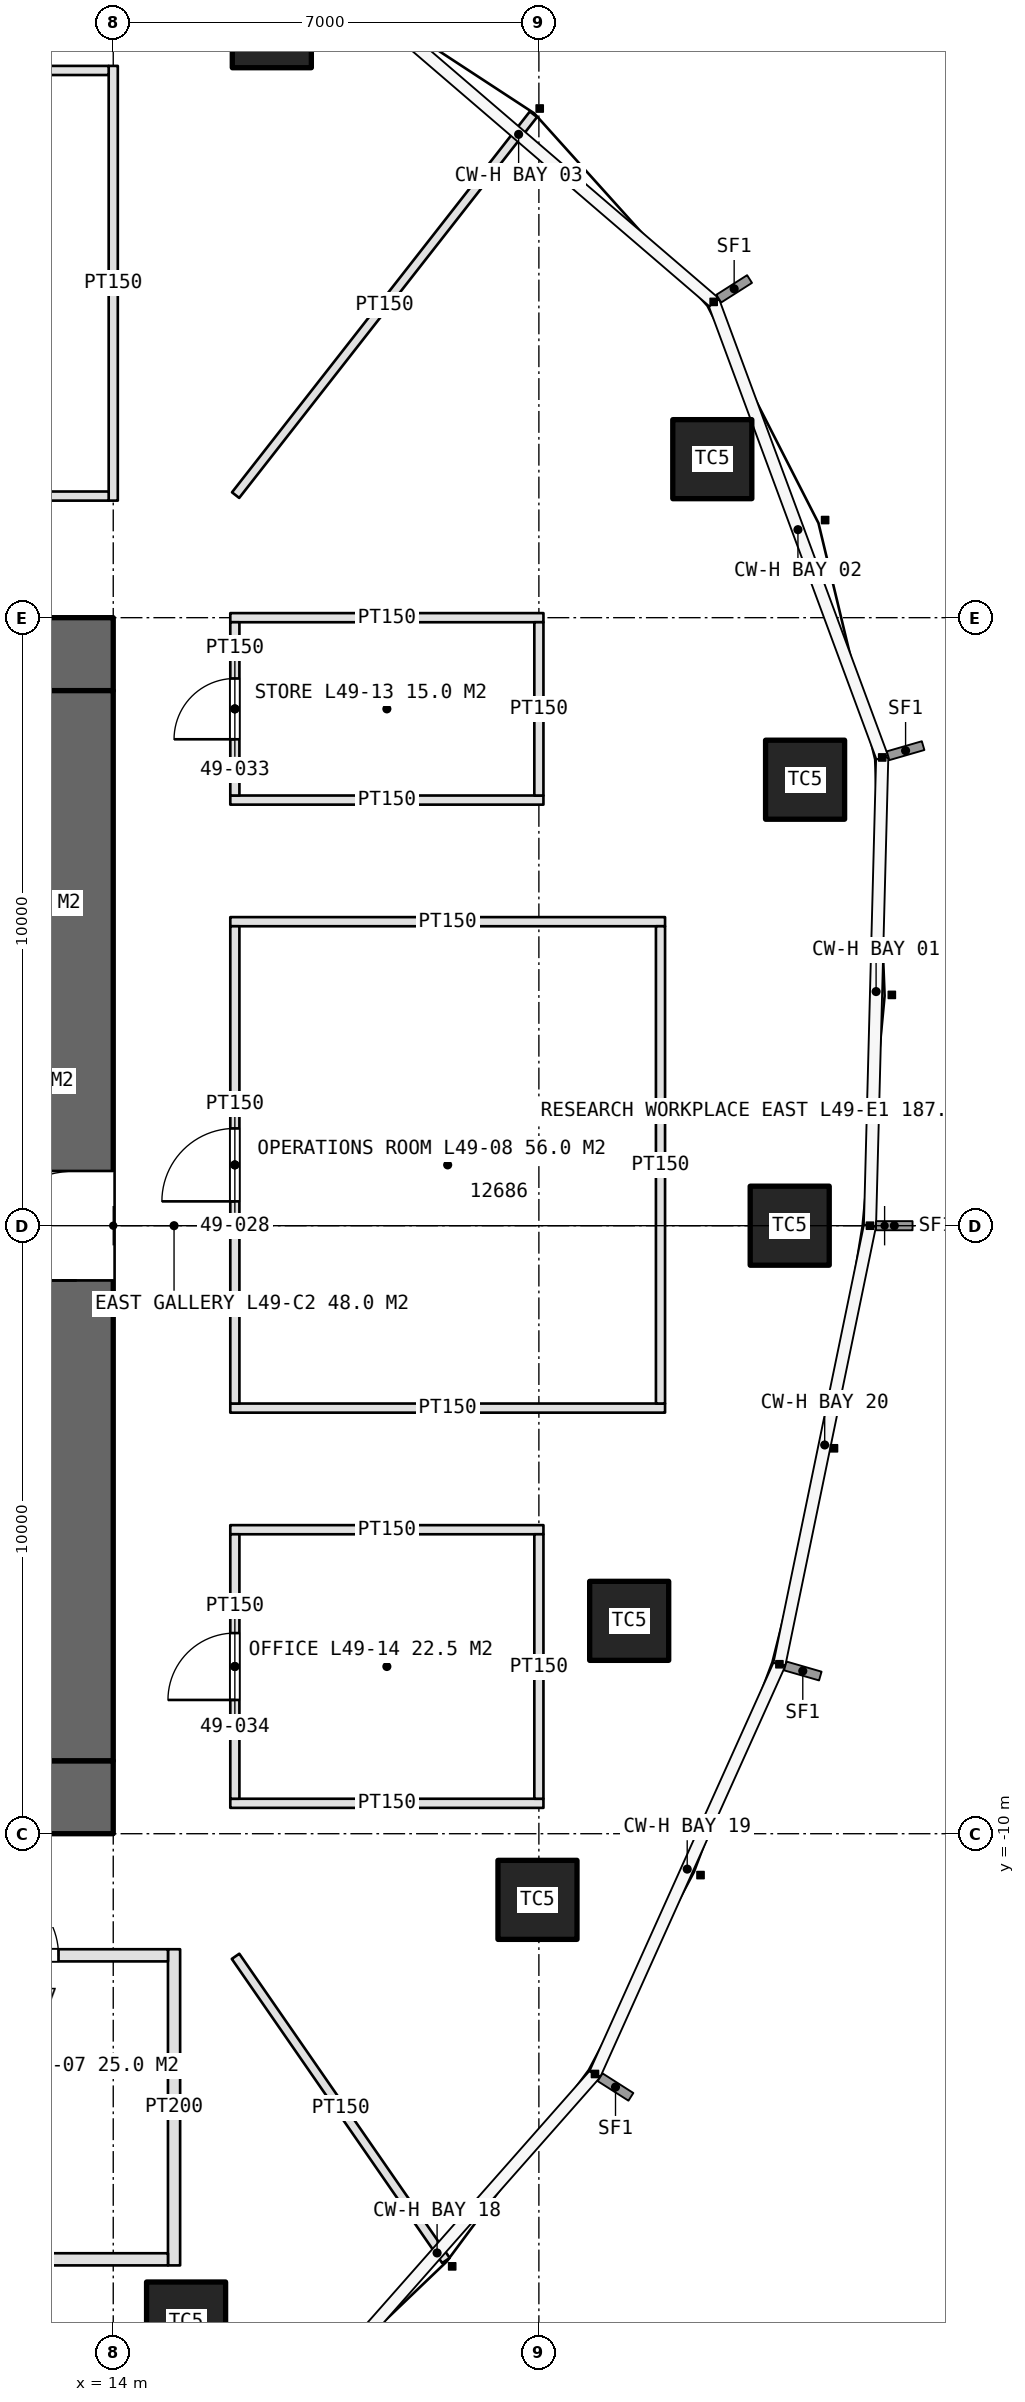
"""IFC4 building model, lengths in metres.
Left out: names, types, materials, properties, quantities, classifications, styles, units other than length and angle.
Written with IfcOpenShell. Run it as: python <this file> out.ifc"""

import sys

from ifc_helpers import new_model, si_unit, direction, frame, frame_2d, origin, origin_2d, place, context, subcontext, project, spatial, rectangle, extrude, element, fill, save


model = new_model("IFC4")
c1 = context("Model", 3, precision=1e-05, world=origin(), true_north=direction((0.0, 1.0)))
c2 = subcontext(c1, "Body", "Model", "MODEL_VIEW")
j1 = project(units=[si_unit("LENGTHUNIT", "METRE"), si_unit("PLANEANGLEUNIT", "RADIAN")], contexts=[c1])
p1 = place(None, origin())
s1 = spatial("IfcSite", under=j1, at=p1, CompositionType="ELEMENT")
p2 = place(p1, origin())
s2 = spatial("IfcBuilding", under=s1, at=p2, CompositionType="ELEMENT")
p3 = place(p2, frame((0.0, 0.0, 224.2)))
s3 = spatial("IfcBuildingStorey", under=s2, at=p3, CompositionType="ELEMENT", Elevation=224.2)
p4 = place(p3, frame((-14.0, -9.4, 0.0), z_axis=(0.0, 0.0, 1.0), x_axis=(1.0, 0.0, 0.0)))
e1 = element("IfcWall", 1, at=p4, inside=s3, PredefinedType="SHEAR", context=c2, shape_type="SweptSolid", body=[
    extrude(rectangle(XDim=28.0, YDim=1.2, at=frame_2d((14.0, 0.0))), origin(), (0.0, 0.0, 1.0), 4.2),
])
p5 = place(p4, frame((22.9, 0.0, 0.0)))
e2 = element("IfcOpeningElement", 2, at=p5, cuts=e1, PredefinedType="OPENING", context=c2, shape_type="SweptSolid", body=[
    extrude(rectangle(XDim=2.2, YDim=2.7, at=frame_2d((1.1, 1.35))), frame((0.0, 0.61, 0.0), z_axis=(0.0, -1.0, 0.0), x_axis=(1.0, 0.0, 0.0)), (0.0, 0.0, 1.0), 1.22),
])
p6 = place(p3, frame((14.0, 9.4, 0.0), z_axis=(0.0, 0.0, 1.0), x_axis=(-1.0, 0.0, 0.0)))
e3 = element("IfcWall", 3, at=p6, inside=s3, PredefinedType="SHEAR", context=c2, shape_type="SweptSolid", body=[
    extrude(rectangle(XDim=28.0, YDim=1.2, at=frame_2d((14.0, 0.0))), origin(), (0.0, 0.0, 1.0), 4.2),
])
p7 = place(p6, frame((24.0, 0.0, 0.0)))
e4 = element("IfcOpeningElement", 4, at=p7, cuts=e3, PredefinedType="OPENING", context=c2, shape_type="SweptSolid", body=[
    extrude(rectangle(XDim=1.0, YDim=2.4, at=frame_2d((0.5, 1.2))), frame((0.0, 0.61, 0.0), z_axis=(0.0, -1.0, 0.0), x_axis=(1.0, 0.0, 0.0)), (0.0, 0.0, 1.0), 1.22),
])
p8 = place(p3, frame((13.4, -8.8, 0.0), z_axis=(0.0, 0.0, 1.0), x_axis=(0.0, 1.0, 0.0)))
e5 = element("IfcWall", 5, at=p8, inside=s3, PredefinedType="SHEAR", context=c2, shape_type="SweptSolid", body=[
    extrude(rectangle(XDim=17.6, YDim=1.2, at=frame_2d((8.8, 0.0))), origin(), (0.0, 0.0, 1.0), 4.2),
])
p9 = place(p8, frame((7.9, 0.0, 0.0)))
e6 = element("IfcOpeningElement", 6, at=p9, cuts=e5, PredefinedType="OPENING", context=c2, shape_type="SweptSolid", body=[
    extrude(rectangle(XDim=1.8, YDim=2.4, at=frame_2d((0.9, 1.2))), frame((0.0, 0.61, 0.0), z_axis=(0.0, -1.0, 0.0), x_axis=(1.0, 0.0, 0.0)), (0.0, 0.0, 1.0), 1.22),
])
for number, where, z_axis, x_axis in (
    (7, (25.125, 0.0, 0.0), (0.0, 0.0, 1.0), (1.0, 0.0, 0.0)),
    (8, (25.378, 7.335, 0.0), (0.0, 0.0, 1.0), (1.0, 0.0, 0.0)),
    (9, (23.852, 12.607, 0.0), (0.0, 0.0, 1.0), (1.0, 0.0, 0.0)),
    (10, (16.608, 19.695, 0.0), (0.0, 0.0, 1.0), (1.0, 0.0, 0.0)),
    (11, (15.198, -18.023, 0.0), (0.0, 0.0, 1.0), (1.0, 0.0, 0.0)),
    (12, (20.977, -11.088, 0.0), (0.0, 0.0, 1.0), (1.0, 0.0, 0.0)),
    (13, (22.485, -6.499, 0.0), (0.0, 0.0, 1.0), (1.0, 0.0, 0.0)),
):
    element("IfcColumn", number, at=place(p3, frame(where, z_axis=z_axis, x_axis=x_axis)), inside=s3, PredefinedType="COLUMN", context=c2, shape_type="SweptSolid", body=[
        extrude(rectangle(XDim=1.3, YDim=1.3, at=origin_2d()), origin(), (0.0, 0.0, 1.0), 4.2),
    ])
p10 = place(p3, frame((14.0, 11.925, 0.0), z_axis=(0.0, 0.0, 1.0), x_axis=(0.0, 1.0, 0.0)))
e14 = element("IfcWall", 14, at=p10, inside=s3, PredefinedType="PARTITIONING", context=c2, shape_type="SweptSolid", body=[
    extrude(rectangle(XDim=7.15, YDim=0.15, at=frame_2d((3.575, 0.0))), origin(), (0.0, 0.0, 1.0), 3.0),
])
p11 = place(p3, frame((4.075, 12.0, 0.0), z_axis=(0.0, 0.0, 1.0), x_axis=(1.0, 0.0, 0.0)))
e15 = element("IfcWall", 15, at=p11, inside=s3, PredefinedType="PARTITIONING", context=c2, shape_type="SweptSolid", body=[
    extrude(rectangle(XDim=9.85, YDim=0.15, at=frame_2d((4.925, 0.0))), origin(), (0.0, 0.0, 1.0), 3.0),
])
p12 = place(p11, frame((4.325, 0.0, 0.0)))
e16 = element("IfcOpeningElement", 16, at=p12, cuts=e15, PredefinedType="OPENING", context=c2, shape_type="SweptSolid", body=[
    extrude(rectangle(XDim=1.2, YDim=2.4, at=frame_2d((0.6, 1.2))), frame((0.0, 0.085, 0.0), z_axis=(0.0, -1.0, 0.0), x_axis=(1.0, 0.0, 0.0)), (0.0, 0.0, 1.0), 0.17),
])
p13 = place(p3, frame((4.075, 19.0, 0.0), z_axis=(0.0, 0.0, 1.0), x_axis=(1.0, 0.0, 0.0)))
e17 = element("IfcWall", 17, at=p13, inside=s3, PredefinedType="PARTITIONING", context=c2, shape_type="SweptSolid", body=[
    extrude(rectangle(XDim=9.85, YDim=0.15, at=frame_2d((4.925, 0.0))), origin(), (0.0, 0.0, 1.0), 3.0),
])
p14 = place(p3, frame((15.0, -11.9, 0.0), z_axis=(0.0, 0.0, 1.0), x_axis=(0.0, -1.0, 0.0)))
e18 = element("IfcWall", 18, at=p14, inside=s3, PredefinedType="PARTITIONING", context=c2, shape_type="SweptSolid", body=[
    extrude(rectangle(XDim=5.2, YDim=0.2, at=frame_2d((2.6, 0.0))), origin(), (0.0, 0.0, 1.0), 3.0),
])
p15 = place(p3, frame((10.1, -12.0, 0.0), z_axis=(0.0, 0.0, 1.0), x_axis=(1.0, 0.0, 0.0)))
e19 = element("IfcWall", 19, at=p15, inside=s3, PredefinedType="PARTITIONING", context=c2, shape_type="SweptSolid", body=[
    extrude(rectangle(XDim=4.8, YDim=0.2, at=frame_2d((2.4, 0.0))), origin(), (0.0, 0.0, 1.0), 3.0),
])
p16 = place(p15, frame((1.8, 0.0, 0.0)))
e20 = element("IfcOpeningElement", 20, at=p16, cuts=e19, PredefinedType="OPENING", context=c2, shape_type="SweptSolid", body=[
    extrude(rectangle(XDim=1.2, YDim=2.4, at=frame_2d((0.6, 1.2))), frame((0.0, 0.11, 0.0), z_axis=(0.0, -1.0, 0.0), x_axis=(1.0, 0.0, 0.0)), (0.0, 0.0, 1.0), 0.22),
])
p17 = place(p3, frame((10.1, -17.0, 0.0), z_axis=(0.0, 0.0, 1.0), x_axis=(1.0, 0.0, 0.0)))
e21 = element("IfcWall", 21, at=p17, inside=s3, PredefinedType="PARTITIONING", context=c2, shape_type="SweptSolid", body=[
    extrude(rectangle(XDim=4.8, YDim=0.2, at=frame_2d((2.4, 0.0))), origin(), (0.0, 0.0, 1.0), 3.0),
])
for number, where, z_axis, x_axis in (
    (22, (15.925, -3.0, 0.0), (0.0, 0.0, 1.0), (1.0, 0.0, 0.0)),
    (23, (15.925, 5.0, 0.0), (0.0, 0.0, 1.0), (1.0, 0.0, 0.0)),
):
    element("IfcWall", number, at=place(p3, frame(where, z_axis=z_axis, x_axis=x_axis)), inside=s3, PredefinedType="PARTITIONING", context=c2, shape_type="SweptSolid", body=[
        extrude(rectangle(XDim=7.15, YDim=0.15, at=frame_2d((3.575, 0.0))), origin(), (0.0, 0.0, 1.0), 3.0),
    ])
p18 = place(p3, frame((16.0, -2.925, 0.0), z_axis=(0.0, 0.0, 1.0), x_axis=(0.0, 1.0, 0.0)))
e24 = element("IfcWall", 24, at=p18, inside=s3, PredefinedType="PARTITIONING", context=c2, shape_type="SweptSolid", body=[
    extrude(rectangle(XDim=7.85, YDim=0.15, at=frame_2d((3.925, 0.0))), origin(), (0.0, 0.0, 1.0), 3.0),
])
p19 = place(p18, frame((3.325, 0.0, 0.0)))
e25 = element("IfcOpeningElement", 25, at=p19, cuts=e24, PredefinedType="OPENING", context=c2, shape_type="SweptSolid", body=[
    extrude(rectangle(XDim=1.2, YDim=2.4, at=frame_2d((0.6, 1.2))), frame((0.0, 0.085, 0.0), z_axis=(0.0, -1.0, 0.0), x_axis=(1.0, 0.0, 0.0)), (0.0, 0.0, 1.0), 0.17),
])
p20 = place(p3, frame((23.0, -2.925, 0.0), z_axis=(0.0, 0.0, 1.0), x_axis=(0.0, 1.0, 0.0)))
e26 = element("IfcWall", 26, at=p20, inside=s3, PredefinedType="PARTITIONING", context=c2, shape_type="SweptSolid", body=[
    extrude(rectangle(XDim=7.85, YDim=0.15, at=frame_2d((3.925, 0.0))), origin(), (0.0, 0.0, 1.0), 3.0),
])
for number, where, z_axis, x_axis in (
    (27, (15.925, 7.0, 0.0), (0.0, 0.0, 1.0), (1.0, 0.0, 0.0)),
    (28, (15.925, 10.0, 0.0), (0.0, 0.0, 1.0), (1.0, 0.0, 0.0)),
):
    element("IfcWall", number, at=place(p3, frame(where, z_axis=z_axis, x_axis=x_axis)), inside=s3, PredefinedType="PARTITIONING", context=c2, shape_type="SweptSolid", body=[
        extrude(rectangle(XDim=5.15, YDim=0.15, at=frame_2d((2.575, 0.0))), origin(), (0.0, 0.0, 1.0), 3.0),
    ])
p21 = place(p3, frame((16.0, 7.075, 0.0), z_axis=(0.0, 0.0, 1.0), x_axis=(0.0, 1.0, 0.0)))
e29 = element("IfcWall", 29, at=p21, inside=s3, PredefinedType="PARTITIONING", context=c2, shape_type="SweptSolid", body=[
    extrude(rectangle(XDim=2.85, YDim=0.15, at=frame_2d((1.425, 0.0))), origin(), (0.0, 0.0, 1.0), 3.0),
])
p22 = place(p21, frame((0.925, 0.0, 0.0)))
e30 = element("IfcOpeningElement", 30, at=p22, cuts=e29, PredefinedType="OPENING", context=c2, shape_type="SweptSolid", body=[
    extrude(rectangle(XDim=1.0, YDim=2.2, at=frame_2d((0.5, 1.1))), frame((0.0, 0.085, 0.0), z_axis=(0.0, -1.0, 0.0), x_axis=(1.0, 0.0, 0.0)), (0.0, 0.0, 1.0), 0.17),
])
p23 = place(p3, frame((21.0, 7.075, 0.0), z_axis=(0.0, 0.0, 1.0), x_axis=(0.0, 1.0, 0.0)))
e31 = element("IfcWall", 31, at=p23, inside=s3, PredefinedType="PARTITIONING", context=c2, shape_type="SweptSolid", body=[
    extrude(rectangle(XDim=2.85, YDim=0.15, at=frame_2d((1.425, 0.0))), origin(), (0.0, 0.0, 1.0), 3.0),
])
for number, where, z_axis, x_axis in (
    (32, (15.925, -9.5, 0.0), (0.0, 0.0, 1.0), (1.0, 0.0, 0.0)),
    (33, (15.925, -5.0, 0.0), (0.0, 0.0, 1.0), (1.0, 0.0, 0.0)),
):
    element("IfcWall", number, at=place(p3, frame(where, z_axis=z_axis, x_axis=x_axis)), inside=s3, PredefinedType="PARTITIONING", context=c2, shape_type="SweptSolid", body=[
        extrude(rectangle(XDim=5.15, YDim=0.15, at=frame_2d((2.575, 0.0))), origin(), (0.0, 0.0, 1.0), 3.0),
    ])
p24 = place(p3, frame((16.0, -9.425, 0.0), z_axis=(0.0, 0.0, 1.0), x_axis=(0.0, 1.0, 0.0)))
e34 = element("IfcWall", 34, at=p24, inside=s3, PredefinedType="PARTITIONING", context=c2, shape_type="SweptSolid", body=[
    extrude(rectangle(XDim=4.35, YDim=0.15, at=frame_2d((2.175, 0.0))), origin(), (0.0, 0.0, 1.0), 3.0),
])
p25 = place(p24, frame((1.625, 0.0, 0.0)))
e35 = element("IfcOpeningElement", 35, at=p25, cuts=e34, PredefinedType="OPENING", context=c2, shape_type="SweptSolid", body=[
    extrude(rectangle(XDim=1.1, YDim=2.3, at=frame_2d((0.55, 1.15))), frame((0.0, 0.085, 0.0), z_axis=(0.0, -1.0, 0.0), x_axis=(1.0, 0.0, 0.0)), (0.0, 0.0, 1.0), 0.17),
])
p26 = place(p3, frame((21.0, -9.425, 0.0), z_axis=(0.0, 0.0, 1.0), x_axis=(0.0, 1.0, 0.0)))
e36 = element("IfcWall", 36, at=p26, inside=s3, PredefinedType="PARTITIONING", context=c2, shape_type="SweptSolid", body=[
    extrude(rectangle(XDim=4.35, YDim=0.15, at=frame_2d((2.175, 0.0))), origin(), (0.0, 0.0, 1.0), 3.0),
])
p27 = place(p3, frame((16.011, -12.016, 0.0), z_axis=(0.0, 0.0, 1.0), x_axis=(0.568863489071, -0.822431961199, 0.0)))
e37 = element("IfcWall", 37, at=p27, inside=s3, PredefinedType="PARTITIONING", context=c2, shape_type="SweptSolid", body=[
    extrude(rectangle(XDim=6.083, YDim=0.15, at=frame_2d((3.042, 0.0))), origin(), (0.0, 0.0, 1.0), 3.0),
])
p28 = place(p3, frame((16.012, 12.016, 0.0), z_axis=(0.0, 0.0, 1.0), x_axis=(0.616030058222, 0.787722646219, 0.0)))
e38 = element("IfcWall", 38, at=p28, inside=s3, PredefinedType="PARTITIONING", context=c2, shape_type="SweptSolid", body=[
    extrude(rectangle(XDim=7.952, YDim=0.15, at=frame_2d((3.976, 0.0))), origin(), (0.0, 0.0, 1.0), 3.0),
])
p29 = place(p9, origin())
e39 = element("IfcDoor", 39, at=p29, inside=s3, OperationType="DOUBLE_DOOR_SINGLE_SWING", PredefinedType="DOOR", context=c2, shape_type="SweptSolid", body=[
    extrude(rectangle(XDim=1.8, YDim=2.4, at=frame_2d((0.9, 1.2))), frame((0.0, 0.025, 0.0), z_axis=(0.0, -1.0, 0.0), x_axis=(1.0, 0.0, 0.0)), (0.0, 0.0, 1.0), 0.05),
])
fill(e6, e39)
p30 = place(p16, origin())
e40 = element("IfcDoor", 40, at=p30, inside=s3, OperationType="SINGLE_SWING_LEFT", PredefinedType="DOOR", context=c2, shape_type="SweptSolid", body=[
    extrude(rectangle(XDim=1.2, YDim=2.4, at=frame_2d((0.6, 1.2))), frame((0.0, 0.025, 0.0), z_axis=(0.0, -1.0, 0.0), x_axis=(1.0, 0.0, 0.0)), (0.0, 0.0, 1.0), 0.05),
])
fill(e20, e40)
p31 = place(p19, origin())
e41 = element("IfcDoor", 41, at=p31, inside=s3, OperationType="SINGLE_SWING_LEFT", PredefinedType="DOOR", context=c2, shape_type="SweptSolid", body=[
    extrude(rectangle(XDim=1.2, YDim=2.4, at=frame_2d((0.6, 1.2))), frame((0.0, 0.025, 0.0), z_axis=(0.0, -1.0, 0.0), x_axis=(1.0, 0.0, 0.0)), (0.0, 0.0, 1.0), 0.05),
])
fill(e25, e41)
p32 = place(p22, origin())
e42 = element("IfcDoor", 42, at=p32, inside=s3, OperationType="SINGLE_SWING_LEFT", PredefinedType="DOOR", context=c2, shape_type="SweptSolid", body=[
    extrude(rectangle(XDim=1.0, YDim=2.2, at=frame_2d((0.5, 1.1))), frame((0.0, 0.025, 0.0), z_axis=(0.0, -1.0, 0.0), x_axis=(1.0, 0.0, 0.0)), (0.0, 0.0, 1.0), 0.05),
])
fill(e30, e42)
p33 = place(p25, origin())
e43 = element("IfcDoor", 43, at=p33, inside=s3, OperationType="SINGLE_SWING_LEFT", PredefinedType="DOOR", context=c2, shape_type="SweptSolid", body=[
    extrude(rectangle(XDim=1.1, YDim=2.3, at=frame_2d((0.55, 1.15))), frame((0.0, 0.025, 0.0), z_axis=(0.0, -1.0, 0.0), x_axis=(1.0, 0.0, 0.0)), (0.0, 0.0, 1.0), 0.05),
])
fill(e35, e43)
save(model, sys.argv[1])
